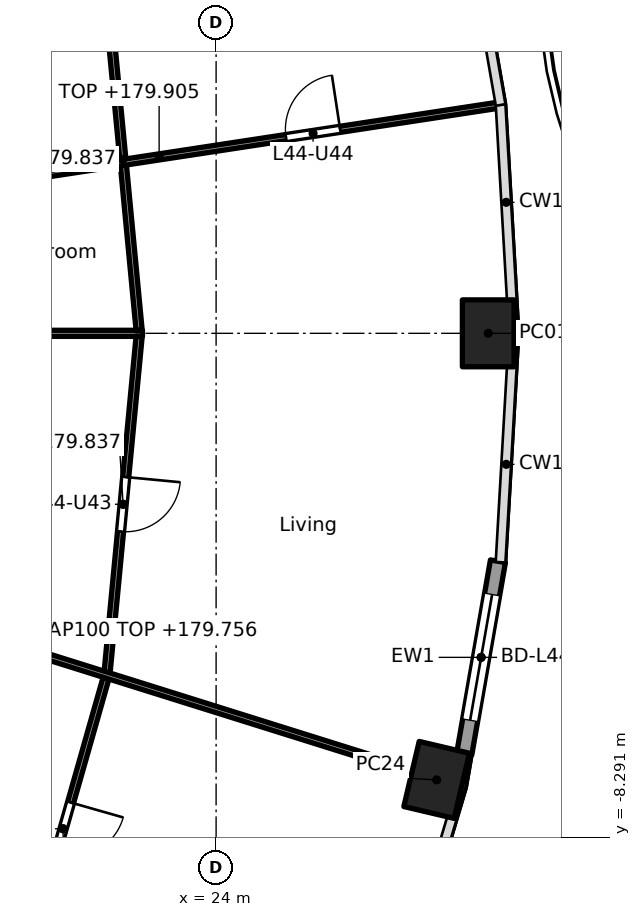
"""IFC4 building model, lengths in metres.
Left out: names, types, materials, properties, quantities, classifications, styles, units other than length and angle.
Written with IfcOpenShell. Run it as: python <this file> out.ifc"""

import sys

from ifc_helpers import new_model, si_unit, direction, frame, frame_2d, origin, origin_2d, place, context, subcontext, project, spatial, rectangle, hollow_rectangle, extrude, element, fill, save


model = new_model("IFC4")
c1 = context("Model", 3, precision=1e-05, world=origin(), true_north=direction((0.0, 1.0)))
c2 = subcontext(c1, "Body", "Model", "MODEL_VIEW")
j1 = project(units=[si_unit("LENGTHUNIT", "METRE"), si_unit("PLANEANGLEUNIT", "RADIAN")], contexts=[c1])
p1 = place(None, origin())
s1 = spatial("IfcSite", under=j1, at=p1, CompositionType="ELEMENT")
p2 = place(p1, origin())
s2 = spatial("IfcBuilding", under=s1, at=p2, CompositionType="ELEMENT")
p3 = place(p2, frame((0.0, 0.0, 177.0)))
s3 = spatial("IfcBuildingStorey", under=s2, at=p3, CompositionType="ELEMENT", Elevation=177.0)
for number, where, z_axis, x_axis in (
    (1, (28.475, 0.0, 0.0), (0.0, 0.0, 1.0), (0.0, 1.0, 0.0)),
    (2, (27.627, -7.344, 0.0), (0.0, 0.0, 1.0), (0.229, 0.973, 0.0)),
):
    element("IfcColumn", number, at=place(p3, frame(where, z_axis=z_axis, x_axis=x_axis)), inside=s3, PredefinedType="COLUMN", context=c2, shape_type="SweptSolid", body=[
        extrude(hollow_rectangle(XDim=1.1, YDim=0.85, WallThickness=0.036, at=origin_2d()), origin(), (0.0, 0.0, 1.0), 3.7),
    ])
p4 = place(p3, frame((28.635, -3.747, 0.0), z_axis=(0.0, 0.0, 1.0), x_axis=(-0.172149769468, -0.985070787747, 0.0)))
e3 = element("IfcWall", 3, at=p4, inside=s3, PredefinedType="SOLIDWALL", context=c2, shape_type="SweptSolid", body=[
    extrude(rectangle(XDim=3.211, YDim=0.25, at=frame_2d((1.605, 0.0))), origin(), (0.0, 0.0, 1.0), 3.44),
])
p5 = place(p4, frame((0.555, 0.0, 0.0)))
e4 = element("IfcOpeningElement", 4, at=p5, cuts=e3, PredefinedType="OPENING", context=c2, shape_type="SweptSolid", body=[
    extrude(rectangle(XDim=2.1, YDim=2.4, at=frame_2d((1.05, 1.2))), frame((0.0, 0.135, 0.0), z_axis=(0.0, -1.0, 0.0), x_axis=(1.0, 0.0, 0.0)), (0.0, 0.0, 1.0), 0.27),
])
p6 = place(p3, frame((14.822, -6.154, 0.0), z_axis=(0.0, 0.0, 1.0), x_axis=(0.792203056092, -0.610257583254, 0.0)))
e5 = element("IfcWall", 5, at=p6, inside=s3, PredefinedType="PARTITIONING", context=c2, shape_type="SweptSolid", body=[
    extrude(rectangle(XDim=12.533, YDim=0.2, at=frame_2d((6.266, 0.0))), origin(), (0.0, 0.0, 1.0), 2.837),
])
p7 = place(p3, frame((12.665, 0.0, 0.0), z_axis=(0.0, 0.0, 1.0), x_axis=(1.0, 0.0, 0.0)))
e6 = element("IfcWall", 6, at=p7, inside=s3, PredefinedType="PARTITIONING", context=c2, shape_type="SweptSolid", body=[
    extrude(rectangle(XDim=10.124, YDim=0.1, at=frame_2d((5.062, 0.0))), origin(), (0.0, 0.0, 1.0), 2.756),
])
p8 = place(p7, frame((1.961, 0.0, 0.0)))
e7 = element("IfcOpeningElement", 7, at=p8, cuts=e6, PredefinedType="OPENING", context=c2, shape_type="SweptSolid", body=[
    extrude(rectangle(XDim=0.9, YDim=2.1, at=frame_2d((0.45, 1.05))), frame((0.0, 0.06, 0.0), z_axis=(0.0, -1.0, 0.0), x_axis=(1.0, 0.0, 0.0)), (0.0, 0.0, 1.0), 0.12),
])
p9 = place(p7, frame((6.999, 0.0, 0.0)))
e8 = element("IfcOpeningElement", 8, at=p9, cuts=e6, PredefinedType="OPENING", context=c2, shape_type="SweptSolid", body=[
    extrude(rectangle(XDim=0.9, YDim=2.1, at=frame_2d((0.45, 1.05))), frame((0.0, 0.06, 0.0), z_axis=(0.0, -1.0, 0.0), x_axis=(1.0, 0.0, 0.0)), (0.0, 0.0, 1.0), 0.12),
])
p10 = place(p3, frame((22.734, 0.05, 0.0), z_axis=(0.0, 0.0, 1.0), x_axis=(-0.0949274088, 0.995484197292, 0.0)))
e9 = element("IfcWall", 9, at=p10, inside=s3, PredefinedType="PARTITIONING", context=c2, shape_type="SweptSolid", body=[
    extrude(rectangle(XDim=5.648, YDim=0.1, at=frame_2d((2.824, 0.0))), origin(), (0.0, 0.0, 1.0), 2.837),
])
p11 = place(p3, frame((22.734, -0.05, 0.0), z_axis=(0.0, 0.0, 1.0), x_axis=(-0.094923312677, -0.995484587882, 0.0)))
e10 = element("IfcWall", 10, at=p11, inside=s3, PredefinedType="PARTITIONING", context=c2, shape_type="SweptSolid", body=[
    extrude(rectangle(XDim=5.548, YDim=0.1, at=frame_2d((2.774, 0.0))), origin(), (0.0, 0.0, 1.0), 2.837),
])
p12 = place(p11, frame((2.324, 0.0, 0.0)))
e11 = element("IfcOpeningElement", 11, at=p12, cuts=e10, PredefinedType="OPENING", context=c2, shape_type="SweptSolid", body=[
    extrude(rectangle(XDim=0.9, YDim=2.1, at=frame_2d((0.45, 1.05))), frame((0.0, 0.06, 0.0), z_axis=(0.0, -1.0, 0.0), x_axis=(1.0, 0.0, 0.0)), (0.0, 0.0, 1.0), 0.12),
])
p13 = place(p3, frame((17.407, 2.039, 0.0), z_axis=(0.0, 0.0, 1.0), x_axis=(0.98858728603, 0.150649188184, 0.0)))
e12 = element("IfcWall", 12, at=p13, inside=s3, PredefinedType="PARTITIONING", context=c2, shape_type="SweptSolid", body=[
    extrude(rectangle(XDim=11.441, YDim=0.1, at=frame_2d((5.721, 0.0))), origin(), (0.0, 0.0, 1.0), 2.905),
])
p14 = place(p13, frame((7.832, 0.0, 0.0)))
e13 = element("IfcOpeningElement", 13, at=p14, cuts=e12, PredefinedType="OPENING", context=c2, shape_type="SweptSolid", body=[
    extrude(rectangle(XDim=0.9, YDim=2.1, at=frame_2d((0.45, 1.05))), frame((0.0, 0.06, 0.0), z_axis=(0.0, -1.0, 0.0), x_axis=(1.0, 0.0, 0.0)), (0.0, 0.0, 1.0), 0.12),
])
p15 = place(p3, frame((20.779, -10.625, 0.0), z_axis=(0.0, 0.0, 1.0), x_axis=(0.273819702124, 0.961781040949, 0.0)))
e14 = element("IfcWall", 14, at=p15, inside=s3, PredefinedType="PARTITIONING", context=c2, shape_type="SweptSolid", body=[
    extrude(rectangle(XDim=5.152, YDim=0.1, at=frame_2d((2.576, 0.0))), origin(), (0.0, 0.0, 1.0), 2.837),
])
p16 = place(p15, frame((2.126, 0.0, 0.0)))
e15 = element("IfcOpeningElement", 15, at=p16, cuts=e14, PredefinedType="OPENING", context=c2, shape_type="SweptSolid", body=[
    extrude(rectangle(XDim=0.9, YDim=2.1, at=frame_2d((0.45, 1.05))), frame((0.0, 0.06, 0.0), z_axis=(0.0, -1.0, 0.0), x_axis=(1.0, 0.0, 0.0)), (0.0, 0.0, 1.0), 0.12),
])
p17 = place(p3, frame((12.66, -2.632, 0.0), z_axis=(0.0, 0.0, 1.0), x_axis=(0.954248738607, -0.299013954302, 0.0)))
e16 = element("IfcWall", 16, at=p17, inside=s3, PredefinedType="PARTITIONING", context=c2, shape_type="SweptSolid", body=[
    extrude(rectangle(XDim=15.142, YDim=0.1, at=frame_2d((7.571, 0.0))), origin(), (0.0, 0.0, 1.0), 2.756),
])
p18 = place(p17, frame((0.669, 0.0, 0.0)))
e17 = element("IfcOpeningElement", 17, at=p18, cuts=e16, PredefinedType="OPENING", context=c2, shape_type="SweptSolid", body=[
    extrude(rectangle(XDim=0.9, YDim=2.1, at=frame_2d((0.45, 1.05))), frame((0.0, 0.06, 0.0), z_axis=(0.0, -1.0, 0.0), x_axis=(1.0, 0.0, 0.0)), (0.0, 0.0, 1.0), 0.12),
])
p19 = place(p17, frame((6.944, 0.0, 0.0)))
e18 = element("IfcOpeningElement", 18, at=p19, cuts=e16, PredefinedType="OPENING", context=c2, shape_type="SweptSolid", body=[
    extrude(rectangle(XDim=0.9, YDim=2.1, at=frame_2d((0.45, 1.05))), frame((0.0, 0.06, 0.0), z_axis=(0.0, -1.0, 0.0), x_axis=(1.0, 0.0, 0.0)), (0.0, 0.0, 1.0), 0.12),
])
p20 = place(p5, origin())
e19 = element("IfcDoor", 19, at=p20, inside=s3, OperationType="SLIDING_TO_LEFT", PredefinedType="DOOR", context=c2, shape_type="SweptSolid", body=[
    extrude(rectangle(XDim=2.1, YDim=2.4, at=frame_2d((1.05, 1.2))), frame((0.0, 0.025, 0.0), z_axis=(0.0, -1.0, 0.0), x_axis=(1.0, 0.0, 0.0)), (0.0, 0.0, 1.0), 0.05),
])
fill(e4, e19)
p21 = place(p16, frame((0.9, 0.0, 0.0), x_axis=(-1.0, 0.0, 0.0)))
e20 = element("IfcDoor", 20, at=p21, inside=s3, OperationType="SINGLE_SWING_LEFT", PredefinedType="DOOR", context=c2, shape_type="SweptSolid", body=[
    extrude(rectangle(XDim=0.9, YDim=2.1, at=frame_2d((0.45, 1.05))), frame((0.0, 0.025, 0.0), z_axis=(0.0, -1.0, 0.0), x_axis=(1.0, 0.0, 0.0)), (0.0, 0.0, 1.0), 0.05),
])
fill(e15, e20)
p22 = place(p12, origin())
e21 = element("IfcDoor", 21, at=p22, inside=s3, OperationType="SINGLE_SWING_LEFT", PredefinedType="DOOR", context=c2, shape_type="SweptSolid", body=[
    extrude(rectangle(XDim=0.9, YDim=2.1, at=frame_2d((0.45, 1.05))), frame((0.0, 0.025, 0.0), z_axis=(0.0, -1.0, 0.0), x_axis=(1.0, 0.0, 0.0)), (0.0, 0.0, 1.0), 0.05),
])
fill(e11, e21)
p23 = place(p14, origin())
e22 = element("IfcDoor", 22, at=p23, inside=s3, OperationType="SINGLE_SWING_RIGHT", PredefinedType="DOOR", context=c2, shape_type="SweptSolid", body=[
    extrude(rectangle(XDim=0.9, YDim=2.1, at=frame_2d((0.45, 1.05))), frame((0.0, 0.025, 0.0), z_axis=(0.0, -1.0, 0.0), x_axis=(1.0, 0.0, 0.0)), (0.0, 0.0, 1.0), 0.05),
])
fill(e13, e22)
save(model, sys.argv[1])
